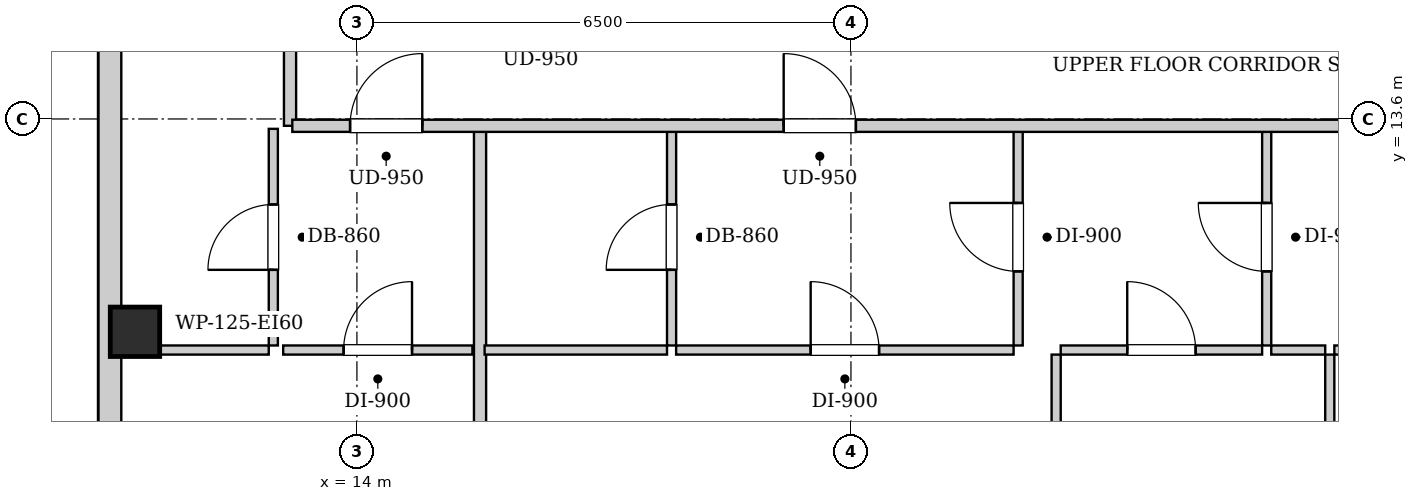
"""IFC4 building model, lengths in metres.
Left out: names, types, materials, properties, quantities, classifications, styles, units other than length and angle.
Written with IfcOpenShell. Run it as: python <this file> out.ifc"""

import sys

from ifc_helpers import new_model, si_unit, direction, frame, frame_2d, origin, origin_2d, place, context, subcontext, project, spatial, rectangle, extrude, element, fill, save


model = new_model("IFC4")
c1 = context("Model", 3, precision=1e-05, world=origin(), true_north=direction((0.0, 1.0)))
c2 = subcontext(c1, "Body", "Model", "MODEL_VIEW")
j1 = project(units=[si_unit("LENGTHUNIT", "METRE"), si_unit("PLANEANGLEUNIT", "RADIAN")], contexts=[c1])
p1 = place(None, origin())
s1 = spatial("IfcSite", under=j1, at=p1, CompositionType="ELEMENT")
p2 = place(p1, origin())
s2 = spatial("IfcBuilding", under=s1, at=p2, CompositionType="ELEMENT")
p3 = place(p2, frame((0.0, 0.0, 190.9)))
s3 = spatial("IfcBuildingStorey", under=s2, at=p3, CompositionType="ELEMENT", Elevation=190.9)
p4 = place(p3, frame((11.08, 10.8, 0.0), z_axis=(0.0, 0.0, 1.0), x_axis=(1.0, 0.0, 0.0)))
e1 = element("IfcColumn", 1, at=p4, inside=s3, PredefinedType="COLUMN", context=c2, shape_type="SweptSolid", body=[
    extrude(rectangle(XDim=0.65, YDim=0.65, at=origin_2d()), origin(), (0.0, 0.0, 1.0), 3.3),
])
p5 = place(p3, frame((10.75, 6.3, 0.0), z_axis=(0.0, 0.0, 1.0), x_axis=(0.0, 1.0, 0.0)))
e2 = element("IfcWall", 2, at=p5, inside=s3, PredefinedType="SOLIDWALL", context=c2, shape_type="SweptSolid", body=[
    extrude(rectangle(XDim=31.4, YDim=0.3, at=frame_2d((15.7, 0.0))), origin(), (0.0, 0.0, 1.0), 3.04),
])
p6 = place(p5, frame((1.504, 0.0, 0.55)))
e3 = element("IfcOpeningElement", 3, at=p6, cuts=e2, PredefinedType="OPENING", context=c2, shape_type="SweptSolid", body=[
    extrude(rectangle(XDim=1.35, YDim=1.2, at=frame_2d((0.675, 0.6))), frame((0.0, 0.16, 0.0), z_axis=(0.0, -1.0, 0.0), x_axis=(1.0, 0.0, 0.0)), (0.0, 0.0, 1.0), 0.32),
])
p7 = place(p5, frame((28.546, 0.0, 0.55)))
e4 = element("IfcOpeningElement", 4, at=p7, cuts=e2, PredefinedType="OPENING", context=c2, shape_type="SweptSolid", body=[
    extrude(rectangle(XDim=1.35, YDim=1.2, at=frame_2d((0.675, 0.6))), frame((0.0, 0.16, 0.0), z_axis=(0.0, -1.0, 0.0), x_axis=(1.0, 0.0, 0.0)), (0.0, 0.0, 1.0), 0.32),
])
p8 = place(p5, frame((11.85, 0.0, 0.55)))
e5 = element("IfcOpeningElement", 5, at=p8, cuts=e2, PredefinedType="OPENING", context=c2, shape_type="SweptSolid", body=[
    extrude(rectangle(XDim=1.35, YDim=1.2, at=frame_2d((0.675, 0.6))), frame((0.0, 0.16, 0.0), z_axis=(0.0, -1.0, 0.0), x_axis=(1.0, 0.0, 0.0)), (0.0, 0.0, 1.0), 0.32),
])
p9 = place(p5, frame((9.185, 0.0, 0.55)))
e6 = element("IfcOpeningElement", 6, at=p9, cuts=e2, PredefinedType="OPENING", context=c2, shape_type="SweptSolid", body=[
    extrude(rectangle(XDim=1.35, YDim=1.2, at=frame_2d((0.675, 0.6))), frame((0.0, 0.16, 0.0), z_axis=(0.0, -1.0, 0.0), x_axis=(1.0, 0.0, 0.0)), (0.0, 0.0, 1.0), 0.32),
])
p10 = place(p5, frame((19.006, 0.0, 0.55)))
e7 = element("IfcOpeningElement", 7, at=p10, cuts=e2, PredefinedType="OPENING", context=c2, shape_type="SweptSolid", body=[
    extrude(rectangle(XDim=1.35, YDim=1.2, at=frame_2d((0.675, 0.6))), frame((0.0, 0.16, 0.0), z_axis=(0.0, -1.0, 0.0), x_axis=(1.0, 0.0, 0.0)), (0.0, 0.0, 1.0), 0.32),
])
p11 = place(p5, frame((20.616, 0.0, 0.55)))
e8 = element("IfcOpeningElement", 8, at=p11, cuts=e2, PredefinedType="OPENING", context=c2, shape_type="SweptSolid", body=[
    extrude(rectangle(XDim=1.35, YDim=1.2, at=frame_2d((0.675, 0.6))), frame((0.0, 0.16, 0.0), z_axis=(0.0, -1.0, 0.0), x_axis=(1.0, 0.0, 0.0)), (0.0, 0.0, 1.0), 0.32),
])
p12 = place(p3, frame((13.12, 13.51, 0.0), z_axis=(0.0, 0.0, 1.0), x_axis=(0.0, 1.0, 0.0)))
e9 = element("IfcWall", 9, at=p12, inside=s3, PredefinedType="PARTITIONING", context=c2, shape_type="SweptSolid", body=[
    extrude(rectangle(XDim=1.58, YDim=0.16, at=frame_2d((0.79, 0.0))), origin(), (0.0, 0.0, 1.0), 3.04),
])
p13 = place(p3, frame((12.9, 10.62, 0.0), z_axis=(0.0, 0.0, 1.0), x_axis=(0.0, 1.0, 0.0)))
e10 = element("IfcWall", 10, at=p13, inside=s3, PredefinedType="PARTITIONING", context=c2, shape_type="SweptSolid", body=[
    extrude(rectangle(XDim=2.85, YDim=0.12, at=frame_2d((1.425, 0.0))), origin(), (0.0, 0.0, 1.0), 3.04),
])
p14 = place(p13, frame((0.995, 0.0, 0.0)))
e11 = element("IfcOpeningElement", 11, at=p14, cuts=e10, PredefinedType="OPENING", context=c2, shape_type="SweptSolid", body=[
    extrude(rectangle(XDim=0.86, YDim=2.05, at=frame_2d((0.43, 1.025))), frame((0.0, 0.07, 0.0), z_axis=(0.0, -1.0, 0.0), x_axis=(1.0, 0.0, 0.0)), (0.0, 0.0, 1.0), 0.14),
])
p15 = place(p3, frame((10.99, 10.56, 0.0), z_axis=(0.0, 0.0, 1.0), x_axis=(1.0, 0.0, 0.0)))
e12 = element("IfcWall", 12, at=p15, inside=s3, PredefinedType="PARTITIONING", context=c2, shape_type="SweptSolid", body=[
    extrude(rectangle(XDim=1.85, YDim=0.12, at=frame_2d((0.925, 0.0))), origin(), (0.0, 0.0, 1.0), 3.04),
])
p16 = place(p3, frame((13.03, 10.56, 0.0), z_axis=(0.0, 0.0, 1.0), x_axis=(1.0, 0.0, 0.0)))
e13 = element("IfcWall", 13, at=p16, inside=s3, PredefinedType="PARTITIONING", context=c2, shape_type="SweptSolid", body=[
    extrude(rectangle(XDim=2.49, YDim=0.12, at=frame_2d((1.245, 0.0))), origin(), (0.0, 0.0, 1.0), 3.04),
])
p17 = place(p16, frame((0.795, 0.0, 0.0)))
e14 = element("IfcOpeningElement", 14, at=p17, cuts=e13, PredefinedType="OPENING", context=c2, shape_type="SweptSolid", body=[
    extrude(rectangle(XDim=0.9, YDim=2.05, at=frame_2d((0.45, 1.025))), frame((0.0, 0.07, 0.0), z_axis=(0.0, -1.0, 0.0), x_axis=(1.0, 0.0, 0.0)), (0.0, 0.0, 1.0), 0.14),
])
p18 = place(p3, frame((15.62, 4.08, 0.0), z_axis=(0.0, 0.0, 1.0), x_axis=(0.0, 1.0, 0.0)))
e15 = element("IfcWall", 15, at=p18, inside=s3, PredefinedType="PARTITIONING", context=c2, shape_type="SweptSolid", body=[
    extrude(rectangle(XDim=9.39, YDim=0.16, at=frame_2d((4.695, 0.0))), origin(), (0.0, 0.0, 1.0), 3.04),
])
p19 = place(p3, frame((18.14, 10.62, 0.0), z_axis=(0.0, 0.0, 1.0), x_axis=(0.0, 1.0, 0.0)))
e16 = element("IfcWall", 16, at=p19, inside=s3, PredefinedType="PARTITIONING", context=c2, shape_type="SweptSolid", body=[
    extrude(rectangle(XDim=2.85, YDim=0.12, at=frame_2d((1.425, 0.0))), origin(), (0.0, 0.0, 1.0), 3.04),
])
p20 = place(p19, frame((0.995, 0.0, 0.0)))
e17 = element("IfcOpeningElement", 17, at=p20, cuts=e16, PredefinedType="OPENING", context=c2, shape_type="SweptSolid", body=[
    extrude(rectangle(XDim=0.86, YDim=2.05, at=frame_2d((0.43, 1.025))), frame((0.0, 0.07, 0.0), z_axis=(0.0, -1.0, 0.0), x_axis=(1.0, 0.0, 0.0)), (0.0, 0.0, 1.0), 0.14),
])
p21 = place(p3, frame((15.68, 10.56, 0.0), z_axis=(0.0, 0.0, 1.0), x_axis=(1.0, 0.0, 0.0)))
e18 = element("IfcWall", 18, at=p21, inside=s3, PredefinedType="PARTITIONING", context=c2, shape_type="SweptSolid", body=[
    extrude(rectangle(XDim=2.4, YDim=0.12, at=frame_2d((1.2, 0.0))), origin(), (0.0, 0.0, 1.0), 3.04),
])
p22 = place(p3, frame((22.7, 10.62, 0.0), z_axis=(0.0, 0.0, 1.0), x_axis=(0.0, 1.0, 0.0)))
e19 = element("IfcWall", 19, at=p22, inside=s3, PredefinedType="PARTITIONING", context=c2, shape_type="SweptSolid", body=[
    extrude(rectangle(XDim=2.85, YDim=0.12, at=frame_2d((1.425, 0.0))), origin(), (0.0, 0.0, 1.0), 3.04),
])
p23 = place(p22, frame((0.975, 0.0, 0.0)))
e20 = element("IfcOpeningElement", 20, at=p23, cuts=e19, PredefinedType="OPENING", context=c2, shape_type="SweptSolid", body=[
    extrude(rectangle(XDim=0.9, YDim=2.05, at=frame_2d((0.45, 1.025))), frame((0.0, 0.07, 0.0), z_axis=(0.0, -1.0, 0.0), x_axis=(1.0, 0.0, 0.0)), (0.0, 0.0, 1.0), 0.14),
])
p24 = place(p3, frame((18.2, 10.56, 0.0), z_axis=(0.0, 0.0, 1.0), x_axis=(1.0, 0.0, 0.0)))
e21 = element("IfcWall", 21, at=p24, inside=s3, PredefinedType="PARTITIONING", context=c2, shape_type="SweptSolid", body=[
    extrude(rectangle(XDim=4.44, YDim=0.12, at=frame_2d((2.22, 0.0))), origin(), (0.0, 0.0, 1.0), 3.04),
])
p25 = place(p24, frame((1.77, 0.0, 0.0)))
e22 = element("IfcOpeningElement", 22, at=p25, cuts=e21, PredefinedType="OPENING", context=c2, shape_type="SweptSolid", body=[
    extrude(rectangle(XDim=0.9, YDim=2.05, at=frame_2d((0.45, 1.025))), frame((0.0, 0.07, 0.0), z_axis=(0.0, -1.0, 0.0), x_axis=(1.0, 0.0, 0.0)), (0.0, 0.0, 1.0), 0.14),
])
p26 = place(p3, frame((25.97, 10.62, 0.0), z_axis=(0.0, 0.0, 1.0), x_axis=(0.0, 1.0, 0.0)))
e23 = element("IfcWall", 23, at=p26, inside=s3, PredefinedType="PARTITIONING", context=c2, shape_type="SweptSolid", body=[
    extrude(rectangle(XDim=2.85, YDim=0.12, at=frame_2d((1.425, 0.0))), origin(), (0.0, 0.0, 1.0), 3.04),
])
p27 = place(p26, frame((0.975, 0.0, 0.0)))
e24 = element("IfcOpeningElement", 24, at=p27, cuts=e23, PredefinedType="OPENING", context=c2, shape_type="SweptSolid", body=[
    extrude(rectangle(XDim=0.9, YDim=2.05, at=frame_2d((0.45, 1.025))), frame((0.0, 0.07, 0.0), z_axis=(0.0, -1.0, 0.0), x_axis=(1.0, 0.0, 0.0)), (0.0, 0.0, 1.0), 0.14),
])
p28 = place(p3, frame((23.26, 10.56, 0.0), z_axis=(0.0, 0.0, 1.0), x_axis=(1.0, 0.0, 0.0)))
e25 = element("IfcWall", 25, at=p28, inside=s3, PredefinedType="PARTITIONING", context=c2, shape_type="SweptSolid", body=[
    extrude(rectangle(XDim=2.65, YDim=0.12, at=frame_2d((1.325, 0.0))), origin(), (0.0, 0.0, 1.0), 3.04),
])
p29 = place(p28, frame((0.875, 0.0, 0.0)))
e26 = element("IfcOpeningElement", 26, at=p29, cuts=e25, PredefinedType="OPENING", context=c2, shape_type="SweptSolid", body=[
    extrude(rectangle(XDim=0.9, YDim=2.05, at=frame_2d((0.45, 1.025))), frame((0.0, 0.07, 0.0), z_axis=(0.0, -1.0, 0.0), x_axis=(1.0, 0.0, 0.0)), (0.0, 0.0, 1.0), 0.14),
])
p30 = place(p3, frame((26.03, 10.56, 0.0), z_axis=(0.0, 0.0, 1.0), x_axis=(1.0, 0.0, 0.0)))
e27 = element("IfcWall", 27, at=p30, inside=s3, PredefinedType="PARTITIONING", context=c2, shape_type="SweptSolid", body=[
    extrude(rectangle(XDim=0.71, YDim=0.12, at=frame_2d((0.355, 0.0))), origin(), (0.0, 0.0, 1.0), 3.04),
])
p31 = place(p3, frame((26.86, 10.56, 0.0), z_axis=(0.0, 0.0, 1.0), x_axis=(1.0, 0.0, 0.0)))
e28 = element("IfcWall", 28, at=p31, inside=s3, PredefinedType="PARTITIONING", context=c2, shape_type="SweptSolid", body=[
    extrude(rectangle(XDim=2.32, YDim=0.12, at=frame_2d((1.16, 0.0))), origin(), (0.0, 0.0, 1.0), 3.04),
])
p32 = place(p31, frame((0.71, 0.0, 0.0)))
e29 = element("IfcOpeningElement", 29, at=p32, cuts=e28, PredefinedType="OPENING", context=c2, shape_type="SweptSolid", body=[
    extrude(rectangle(XDim=0.9, YDim=2.05, at=frame_2d((0.45, 1.025))), frame((0.0, 0.07, 0.0), z_axis=(0.0, -1.0, 0.0), x_axis=(1.0, 0.0, 0.0)), (0.0, 0.0, 1.0), 0.14),
])
p33 = place(p3, frame((23.2, 4.08, 0.0), z_axis=(0.0, 0.0, 1.0), x_axis=(0.0, 1.0, 0.0)))
e30 = element("IfcWall", 30, at=p33, inside=s3, PredefinedType="PARTITIONING", context=c2, shape_type="SweptSolid", body=[
    extrude(rectangle(XDim=6.42, YDim=0.12, at=frame_2d((3.21, 0.0))), origin(), (0.0, 0.0, 1.0), 3.04),
])
p34 = place(p33, frame((2.745, 0.0, 0.0)))
e31 = element("IfcOpeningElement", 31, at=p34, cuts=e30, PredefinedType="OPENING", context=c2, shape_type="SweptSolid", body=[
    extrude(rectangle(XDim=0.9, YDim=2.05, at=frame_2d((0.45, 1.025))), frame((0.0, 0.07, 0.0), z_axis=(0.0, -1.0, 0.0), x_axis=(1.0, 0.0, 0.0)), (0.0, 0.0, 1.0), 0.14),
])
p35 = place(p3, frame((26.8, 4.08, 0.0), z_axis=(0.0, 0.0, 1.0), x_axis=(0.0, 1.0, 0.0)))
e32 = element("IfcWall", 32, at=p35, inside=s3, PredefinedType="PARTITIONING", context=c2, shape_type="SweptSolid", body=[
    extrude(rectangle(XDim=6.42, YDim=0.12, at=frame_2d((3.21, 0.0))), origin(), (0.0, 0.0, 1.0), 3.04),
])
p36 = place(p35, frame((2.745, 0.0, 0.0)))
e33 = element("IfcOpeningElement", 33, at=p36, cuts=e32, PredefinedType="OPENING", context=c2, shape_type="SweptSolid", body=[
    extrude(rectangle(XDim=0.9, YDim=2.05, at=frame_2d((0.45, 1.025))), frame((0.0, 0.07, 0.0), z_axis=(0.0, -1.0, 0.0), x_axis=(1.0, 0.0, 0.0)), (0.0, 0.0, 1.0), 0.14),
])
p37 = place(p3, frame((13.15, 13.51, 0.0), z_axis=(0.0, 0.0, 1.0), x_axis=(1.0, 0.0, 0.0)))
e34 = element("IfcWall", 34, at=p37, inside=s3, PredefinedType="PARTITIONING", context=c2, shape_type="SweptSolid", body=[
    extrude(rectangle(XDim=24.6, YDim=0.16, at=frame_2d((12.3, 0.0))), origin(), (0.0, 0.0, 1.0), 3.04),
])
p38 = place(p37, frame((0.76, 0.0, 0.0)))
e35 = element("IfcOpeningElement", 35, at=p38, cuts=e34, PredefinedType="OPENING", context=c2, shape_type="SweptSolid", body=[
    extrude(rectangle(XDim=0.95, YDim=2.1, at=frame_2d((0.475, 1.05))), frame((0.0, 0.09, 0.0), z_axis=(0.0, -1.0, 0.0), x_axis=(1.0, 0.0, 0.0)), (0.0, 0.0, 1.0), 0.18),
])
p39 = place(p37, frame((6.465, 0.0, 0.0)))
e36 = element("IfcOpeningElement", 36, at=p39, cuts=e34, PredefinedType="OPENING", context=c2, shape_type="SweptSolid", body=[
    extrude(rectangle(XDim=0.95, YDim=2.1, at=frame_2d((0.475, 1.05))), frame((0.0, 0.09, 0.0), z_axis=(0.0, -1.0, 0.0), x_axis=(1.0, 0.0, 0.0)), (0.0, 0.0, 1.0), 0.18),
])
p40 = place(p37, frame((21.889, 0.0, 0.0)))
e37 = element("IfcOpeningElement", 37, at=p40, cuts=e34, PredefinedType="OPENING", context=c2, shape_type="SweptSolid", body=[
    extrude(rectangle(XDim=0.95, YDim=2.1, at=frame_2d((0.475, 1.05))), frame((0.0, 0.09, 0.0), z_axis=(0.0, -1.0, 0.0), x_axis=(1.0, 0.0, 0.0)), (0.0, 0.0, 1.0), 0.18),
])
p41 = place(p14, origin())
e38 = element("IfcDoor", 38, at=p41, inside=s3, OperationType="SINGLE_SWING_LEFT", PredefinedType="DOOR", context=c2, shape_type="SweptSolid", body=[
    extrude(rectangle(XDim=0.86, YDim=2.05, at=frame_2d((0.43, 1.025))), frame((0.0, 0.025, 0.0), z_axis=(0.0, -1.0, 0.0), x_axis=(1.0, 0.0, 0.0)), (0.0, 0.0, 1.0), 0.05),
])
fill(e11, e38)
p42 = place(p17, origin())
e39 = element("IfcDoor", 39, at=p42, inside=s3, OperationType="SINGLE_SWING_RIGHT", PredefinedType="DOOR", context=c2, shape_type="SweptSolid", body=[
    extrude(rectangle(XDim=0.9, YDim=2.05, at=frame_2d((0.45, 1.025))), frame((0.0, 0.025, 0.0), z_axis=(0.0, -1.0, 0.0), x_axis=(1.0, 0.0, 0.0)), (0.0, 0.0, 1.0), 0.05),
])
fill(e14, e39)
p43 = place(p20, origin())
e40 = element("IfcDoor", 40, at=p43, inside=s3, OperationType="SINGLE_SWING_LEFT", PredefinedType="DOOR", context=c2, shape_type="SweptSolid", body=[
    extrude(rectangle(XDim=0.86, YDim=2.05, at=frame_2d((0.43, 1.025))), frame((0.0, 0.025, 0.0), z_axis=(0.0, -1.0, 0.0), x_axis=(1.0, 0.0, 0.0)), (0.0, 0.0, 1.0), 0.05),
])
fill(e17, e40)
p44 = place(p23, origin())
e41 = element("IfcDoor", 41, at=p44, inside=s3, OperationType="SINGLE_SWING_RIGHT", PredefinedType="DOOR", context=c2, shape_type="SweptSolid", body=[
    extrude(rectangle(XDim=0.9, YDim=2.05, at=frame_2d((0.45, 1.025))), frame((0.0, 0.025, 0.0), z_axis=(0.0, -1.0, 0.0), x_axis=(1.0, 0.0, 0.0)), (0.0, 0.0, 1.0), 0.05),
])
fill(e20, e41)
p45 = place(p25, origin())
e42 = element("IfcDoor", 42, at=p45, inside=s3, OperationType="SINGLE_SWING_LEFT", PredefinedType="DOOR", context=c2, shape_type="SweptSolid", body=[
    extrude(rectangle(XDim=0.9, YDim=2.05, at=frame_2d((0.45, 1.025))), frame((0.0, 0.025, 0.0), z_axis=(0.0, -1.0, 0.0), x_axis=(1.0, 0.0, 0.0)), (0.0, 0.0, 1.0), 0.05),
])
fill(e22, e42)
p46 = place(p27, origin())
e43 = element("IfcDoor", 43, at=p46, inside=s3, OperationType="SINGLE_SWING_RIGHT", PredefinedType="DOOR", context=c2, shape_type="SweptSolid", body=[
    extrude(rectangle(XDim=0.9, YDim=2.05, at=frame_2d((0.45, 1.025))), frame((0.0, 0.025, 0.0), z_axis=(0.0, -1.0, 0.0), x_axis=(1.0, 0.0, 0.0)), (0.0, 0.0, 1.0), 0.05),
])
fill(e24, e43)
p47 = place(p29, origin())
e44 = element("IfcDoor", 44, at=p47, inside=s3, OperationType="SINGLE_SWING_LEFT", PredefinedType="DOOR", context=c2, shape_type="SweptSolid", body=[
    extrude(rectangle(XDim=0.9, YDim=2.05, at=frame_2d((0.45, 1.025))), frame((0.0, 0.025, 0.0), z_axis=(0.0, -1.0, 0.0), x_axis=(1.0, 0.0, 0.0)), (0.0, 0.0, 1.0), 0.05),
])
fill(e26, e44)
p48 = place(p38, origin())
e45 = element("IfcDoor", 45, at=p48, inside=s3, OperationType="SINGLE_SWING_RIGHT", PredefinedType="DOOR", context=c2, shape_type="SweptSolid", body=[
    extrude(rectangle(XDim=0.95, YDim=2.1, at=frame_2d((0.475, 1.05))), frame((0.0, 0.025, 0.0), z_axis=(0.0, -1.0, 0.0), x_axis=(1.0, 0.0, 0.0)), (0.0, 0.0, 1.0), 0.05),
])
fill(e35, e45)
p49 = place(p39, origin())
e46 = element("IfcDoor", 46, at=p49, inside=s3, OperationType="SINGLE_SWING_LEFT", PredefinedType="DOOR", context=c2, shape_type="SweptSolid", body=[
    extrude(rectangle(XDim=0.95, YDim=2.1, at=frame_2d((0.475, 1.05))), frame((0.0, 0.025, 0.0), z_axis=(0.0, -1.0, 0.0), x_axis=(1.0, 0.0, 0.0)), (0.0, 0.0, 1.0), 0.05),
])
fill(e36, e46)
save(model, sys.argv[1])
